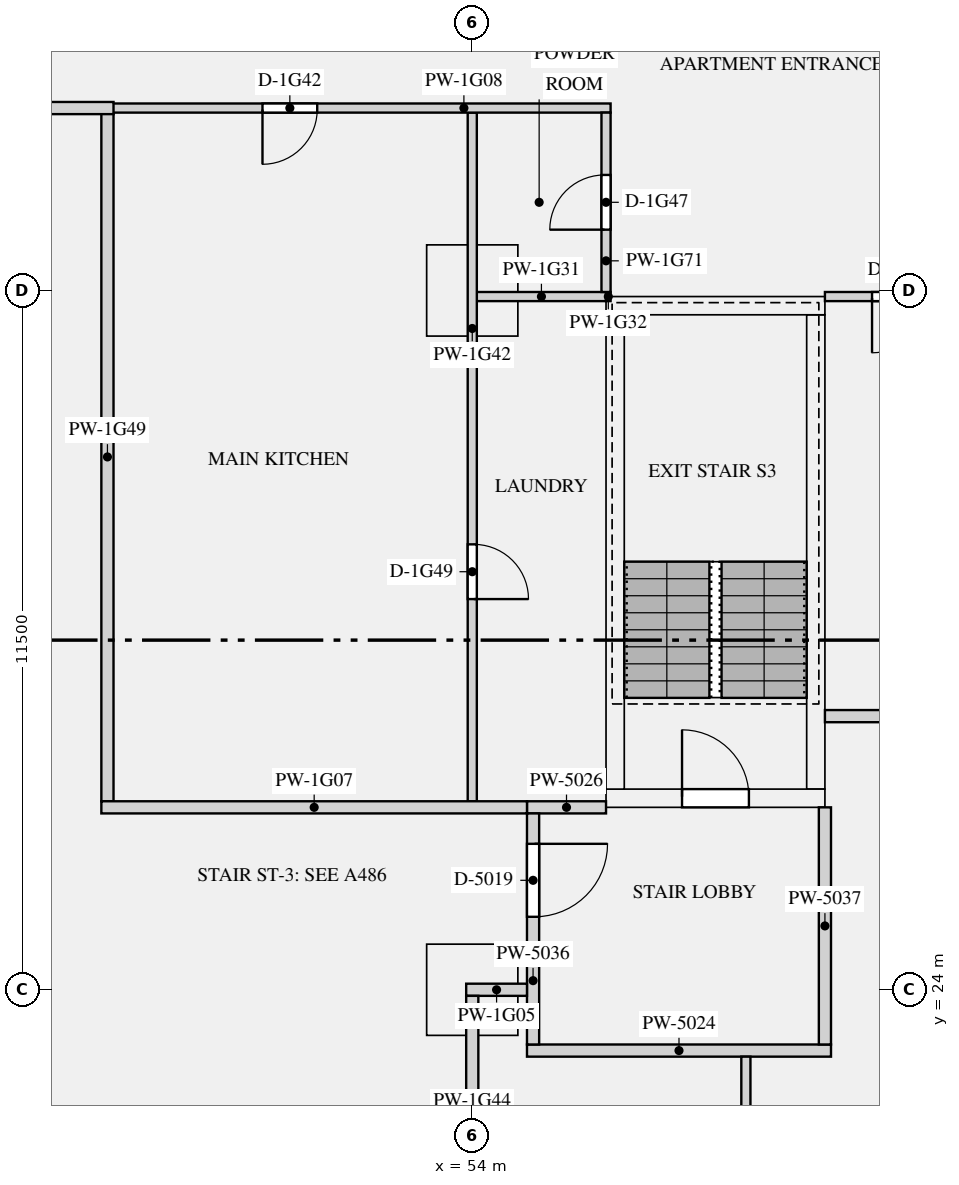
"""IFC4 building model, lengths in metres.
Left out: names, types, materials, properties, quantities, classifications, styles, units other than length and angle.
Written with IfcOpenShell. Run it as: python <this file> out.ifc"""

import sys

from ifc_helpers import new_model, si_unit, direction, frame, frame_2d, origin, origin_2d, place, context, subcontext, project, spatial, rectangle, extrude, element, fill, save


model = new_model("IFC4")
c1 = context("Model", 3, precision=1e-05, world=origin(), true_north=direction((0.0, 1.0)))
c2 = subcontext(c1, "Body", "Model", "MODEL_VIEW")
j1 = project(units=[si_unit("LENGTHUNIT", "METRE"), si_unit("PLANEANGLEUNIT", "RADIAN")], contexts=[c1])
p1 = place(None, origin())
s1 = spatial("IfcSite", under=j1, at=p1, CompositionType="ELEMENT")
p2 = place(p1, origin())
s2 = spatial("IfcBuilding", under=s1, at=p2, CompositionType="ELEMENT")
p3 = place(p2, frame((0.0, 0.0, 66.75)))
s3 = spatial("IfcBuildingStorey", under=s2, at=p3, CompositionType="ELEMENT", Elevation=66.75)
for number, where, z_axis, x_axis in (
    (1, (54.0, 24.0, 0.0), (0.0, 0.0, 1.0), (1.0, 0.0, 0.0)),
    (2, (54.0, 35.5, 0.0), (0.0, 0.0, 1.0), (1.0, 0.0, 0.0)),
):
    element("IfcColumn", number, at=place(p3, frame(where, z_axis=z_axis, x_axis=x_axis)), inside=s3, PredefinedType="COLUMN", context=c2, shape_type="SweptSolid", body=[
        extrude(rectangle(XDim=1.5, YDim=1.5, at=origin_2d()), origin(), (0.0, 0.0, 1.0), 3.15),
    ])
p4 = place(p3, frame((56.2, 27.15, 0.0), z_axis=(0.0, 0.0, 1.0), x_axis=(1.0, 0.0, 0.0)))
e3 = element("IfcWall", 3, at=p4, inside=s3, PredefinedType="SHEAR", context=c2, shape_type="SweptSolid", body=[
    extrude(rectangle(XDim=3.6, YDim=0.3, at=frame_2d((1.8, 0.0))), origin(), (0.0, 0.0, 1.0), 3.15),
])
p5 = place(p4, frame((1.25, 0.0, 0.0)))
e4 = element("IfcOpeningElement", 4, at=p5, cuts=e3, PredefinedType="OPENING", context=c2, shape_type="SweptSolid", body=[
    extrude(rectangle(XDim=1.1, YDim=2.1, at=frame_2d((0.55, 1.05))), frame((0.0, 0.16, 0.0), z_axis=(0.0, -1.0, 0.0), x_axis=(1.0, 0.0, 0.0)), (0.0, 0.0, 1.0), 0.32),
])
p6 = place(p3, frame((56.2, 35.25, 0.0), z_axis=(0.0, 0.0, 1.0), x_axis=(1.0, 0.0, 0.0)))
e5 = element("IfcWall", 5, at=p6, inside=s3, PredefinedType="SHEAR", context=c2, shape_type="SweptSolid", body=[
    extrude(rectangle(XDim=3.6, YDim=0.3, at=frame_2d((1.8, 0.0))), origin(), (0.0, 0.0, 1.0), 3.15),
])
for number, where, z_axis, x_axis in (
    (6, (56.35, 27.3, 0.0), (0.0, 0.0, 1.0), (0.0, 1.0, 0.0)),
    (7, (59.65, 27.3, 0.0), (0.0, 0.0, 1.0), (0.0, 1.0, 0.0)),
):
    element("IfcWall", number, at=place(p3, frame(where, z_axis=z_axis, x_axis=x_axis)), inside=s3, PredefinedType="SHEAR", context=c2, shape_type="SweptSolid", body=[
        extrude(rectangle(XDim=7.8, YDim=0.3, at=frame_2d((3.9, 0.0))), origin(), (0.0, 0.0, 1.0), 3.15),
    ])
p7 = place(p3, frame((54.9, 23.0, 0.0), z_axis=(0.0, 0.0, 1.0), x_axis=(1.0, 0.0, 0.0)))
e8 = element("IfcWall", 8, at=p7, inside=s3, PredefinedType="PARTITIONING", context=c2, shape_type="SweptSolid", body=[
    extrude(rectangle(XDim=5.0, YDim=0.2, at=frame_2d((2.5, 0.0))), origin(), (0.0, 0.0, 1.0), 2.83),
])
p8 = place(p3, frame((54.9, 27.0, 0.0), z_axis=(0.0, 0.0, 1.0), x_axis=(1.0, 0.0, 0.0)))
e9 = element("IfcWall", 9, at=p8, inside=s3, PredefinedType="PARTITIONING", context=c2, shape_type="SweptSolid", body=[
    extrude(rectangle(XDim=1.3, YDim=0.2, at=frame_2d((0.65, 0.0))), origin(), (0.0, 0.0, 1.0), 2.83),
])
p9 = place(p3, frame((55.0, 23.1, 0.0), z_axis=(0.0, 0.0, 1.0), x_axis=(0.0, 1.0, 0.0)))
e10 = element("IfcWall", 10, at=p9, inside=s3, PredefinedType="PARTITIONING", context=c2, shape_type="SweptSolid", body=[
    extrude(rectangle(XDim=3.8, YDim=0.2, at=frame_2d((1.9, 0.0))), origin(), (0.0, 0.0, 1.0), 2.83),
])
p10 = place(p9, frame((2.1, 0.0, 0.0)))
e11 = element("IfcOpeningElement", 11, at=p10, cuts=e10, PredefinedType="OPENING", context=c2, shape_type="SweptSolid", body=[
    extrude(rectangle(XDim=1.2, YDim=2.1, at=frame_2d((0.6, 1.05))), frame((0.0, 0.11, 0.0), z_axis=(0.0, -1.0, 0.0), x_axis=(1.0, 0.0, 0.0)), (0.0, 0.0, 1.0), 0.22),
])
p11 = place(p3, frame((59.8, 23.1, 0.0), z_axis=(0.0, 0.0, 1.0), x_axis=(0.0, 1.0, 0.0)))
e12 = element("IfcWall", 12, at=p11, inside=s3, PredefinedType="PARTITIONING", context=c2, shape_type="SweptSolid", body=[
    extrude(rectangle(XDim=3.9, YDim=0.2, at=frame_2d((1.95, 0.0))), origin(), (0.0, 0.0, 1.0), 2.83),
])
p12 = place(p3, frame((53.9, 24.0, 0.0), z_axis=(0.0, 0.0, 1.0), x_axis=(1.0, 0.0, 0.0)))
e13 = element("IfcWall", 13, at=p12, inside=s3, PredefinedType="PARTITIONING", context=c2, shape_type="SweptSolid", body=[
    extrude(rectangle(XDim=1.0, YDim=0.2, at=frame_2d((0.5, 0.0))), origin(), (0.0, 0.0, 1.0), 2.83),
])
p13 = place(p3, frame((47.9, 27.0, 0.0), z_axis=(0.0, 0.0, 1.0), x_axis=(1.0, 0.0, 0.0)))
e14 = element("IfcWall", 14, at=p13, inside=s3, PredefinedType="PARTITIONING", context=c2, shape_type="SweptSolid", body=[
    extrude(rectangle(XDim=7.0, YDim=0.2, at=frame_2d((3.5, 0.0))), origin(), (0.0, 0.0, 1.0), 2.83),
])
p14 = place(p3, frame((47.9, 38.5, 0.0), z_axis=(0.0, 0.0, 1.0), x_axis=(1.0, 0.0, 0.0)))
e15 = element("IfcWall", 15, at=p14, inside=s3, PredefinedType="PARTITIONING", context=c2, shape_type="SweptSolid", body=[
    extrude(rectangle(XDim=8.375, YDim=0.15, at=frame_2d((4.188, 0.0))), origin(), (0.0, 0.0, 1.0), 2.83),
])
p15 = place(p14, frame((2.65, 0.0, 0.0)))
e16 = element("IfcOpeningElement", 16, at=p15, cuts=e15, PredefinedType="OPENING", context=c2, shape_type="SweptSolid", body=[
    extrude(rectangle(XDim=0.9, YDim=2.1, at=frame_2d((0.45, 1.05))), frame((0.0, 0.085, 0.0), z_axis=(0.0, -1.0, 0.0), x_axis=(1.0, 0.0, 0.0)), (0.0, 0.0, 1.0), 0.17),
])
p16 = place(p3, frame((23.925, 38.5, 0.0), z_axis=(0.0, 0.0, 1.0), x_axis=(1.0, 0.0, 0.0)))
e17 = element("IfcWall", 17, at=p16, inside=s3, PredefinedType="PARTITIONING", context=c2, shape_type="SweptSolid", body=[
    extrude(rectangle(XDim=24.175, YDim=0.2, at=frame_2d((12.087, 0.0))), origin(), (0.0, 0.0, 1.0), 2.83),
])
p17 = place(p16, frame((21.375, 0.0, 0.0)))
e18 = element("IfcOpeningElement", 18, at=p17, cuts=e17, PredefinedType="OPENING", context=c2, shape_type="SweptSolid", body=[
    extrude(rectangle(XDim=1.1, YDim=2.1, at=frame_2d((0.55, 1.05))), frame((0.0, 0.11, 0.0), z_axis=(0.0, -1.0, 0.0), x_axis=(1.0, 0.0, 0.0)), (0.0, 0.0, 1.0), 0.22),
])
p18 = place(p3, frame((59.8, 28.5, 0.0), z_axis=(0.0, 0.0, 1.0), x_axis=(1.0, 0.0, 0.0)))
e19 = element("IfcWall", 19, at=p18, inside=s3, PredefinedType="PARTITIONING", context=c2, shape_type="SweptSolid", body=[
    extrude(rectangle(XDim=3.275, YDim=0.2, at=frame_2d((1.637, 0.0))), origin(), (0.0, 0.0, 1.0), 2.83),
])
p19 = place(p3, frame((54.075, 35.4, 0.0), z_axis=(0.0, 0.0, 1.0), x_axis=(1.0, 0.0, 0.0)))
e20 = element("IfcWall", 20, at=p19, inside=s3, PredefinedType="PARTITIONING", context=c2, shape_type="SweptSolid", body=[
    extrude(rectangle(XDim=2.125, YDim=0.15, at=frame_2d((1.062, 0.0))), origin(), (0.0, 0.0, 1.0), 2.83),
])
p20 = place(p3, frame((56.2, 35.4, 0.0), z_axis=(0.0, 0.0, 1.0), x_axis=(1.0, 0.0, 0.0)))
e21 = element("IfcWall", 21, at=p20, inside=s3, PredefinedType="PARTITIONING", context=c2, shape_type="SweptSolid", body=[
    extrude(rectangle(XDim=0.075, YDim=0.15, at=frame_2d((0.038, 0.0))), origin(), (0.0, 0.0, 1.0), 2.83),
])
p21 = place(p3, frame((59.8, 35.4, 0.0), z_axis=(0.0, 0.0, 1.0), x_axis=(1.0, 0.0, 0.0)))
e22 = element("IfcWall", 22, at=p21, inside=s3, PredefinedType="PARTITIONING", context=c2, shape_type="SweptSolid", body=[
    extrude(rectangle(XDim=3.125, YDim=0.15, at=frame_2d((1.562, 0.0))), origin(), (0.0, 0.0, 1.0), 2.83),
])
p22 = place(p21, frame((0.775, 0.0, 0.0)))
e23 = element("IfcOpeningElement", 23, at=p22, cuts=e22, PredefinedType="OPENING", context=c2, shape_type="SweptSolid", body=[
    extrude(rectangle(XDim=0.9, YDim=2.1, at=frame_2d((0.45, 1.05))), frame((0.0, 0.085, 0.0), z_axis=(0.0, -1.0, 0.0), x_axis=(1.0, 0.0, 0.0)), (0.0, 0.0, 1.0), 0.17),
])
p23 = place(p3, frame((54.0, 27.1, 0.0), z_axis=(0.0, 0.0, 1.0), x_axis=(0.0, 1.0, 0.0)))
e24 = element("IfcWall", 24, at=p23, inside=s3, PredefinedType="PARTITIONING", context=c2, shape_type="SweptSolid", body=[
    extrude(rectangle(XDim=11.325, YDim=0.15, at=frame_2d((5.663, 0.0))), origin(), (0.0, 0.0, 1.0), 2.83),
])
p24 = place(p23, frame((3.325, 0.0, 0.0)))
e25 = element("IfcOpeningElement", 25, at=p24, cuts=e24, PredefinedType="OPENING", context=c2, shape_type="SweptSolid", body=[
    extrude(rectangle(XDim=0.9, YDim=2.1, at=frame_2d((0.45, 1.05))), frame((0.0, 0.085, 0.0), z_axis=(0.0, -1.0, 0.0), x_axis=(1.0, 0.0, 0.0)), (0.0, 0.0, 1.0), 0.17),
])
p25 = place(p3, frame((54.0, 16.1, 0.0), z_axis=(0.0, 0.0, 1.0), x_axis=(0.0, 1.0, 0.0)))
e26 = element("IfcWall", 26, at=p25, inside=s3, PredefinedType="PARTITIONING", context=c2, shape_type="SweptSolid", body=[
    extrude(rectangle(XDim=7.8, YDim=0.2, at=frame_2d((3.9, 0.0))), origin(), (0.0, 0.0, 1.0), 2.83),
])
p26 = place(p25, frame((2.35, 0.0, 0.0)))
e27 = element("IfcOpeningElement", 27, at=p26, cuts=e26, PredefinedType="OPENING", context=c2, shape_type="SweptSolid", body=[
    extrude(rectangle(XDim=1.1, YDim=2.1, at=frame_2d((0.55, 1.05))), frame((0.0, 0.11, 0.0), z_axis=(0.0, -1.0, 0.0), x_axis=(1.0, 0.0, 0.0)), (0.0, 0.0, 1.0), 0.22),
])
p27 = place(p3, frame((48.0, 27.1, 0.0), z_axis=(0.0, 0.0, 1.0), x_axis=(0.0, 1.0, 0.0)))
e28 = element("IfcWall", 28, at=p27, inside=s3, PredefinedType="PARTITIONING", context=c2, shape_type="SweptSolid", body=[
    extrude(rectangle(XDim=11.325, YDim=0.2, at=frame_2d((5.663, 0.0))), origin(), (0.0, 0.0, 1.0), 2.83),
])
p28 = place(p3, frame((56.2, 35.475, 0.0), z_axis=(0.0, 0.0, 1.0), x_axis=(0.0, 1.0, 0.0)))
e29 = element("IfcWall", 29, at=p28, inside=s3, PredefinedType="PARTITIONING", context=c2, shape_type="SweptSolid", body=[
    extrude(rectangle(XDim=2.95, YDim=0.15, at=frame_2d((1.475, 0.0))), origin(), (0.0, 0.0, 1.0), 2.83),
])
p29 = place(p28, frame((1.025, 0.0, 0.0)))
e30 = element("IfcOpeningElement", 30, at=p29, cuts=e29, PredefinedType="OPENING", context=c2, shape_type="SweptSolid", body=[
    extrude(rectangle(XDim=0.9, YDim=2.1, at=frame_2d((0.45, 1.05))), frame((0.0, 0.085, 0.0), z_axis=(0.0, -1.0, 0.0), x_axis=(1.0, 0.0, 0.0)), (0.0, 0.0, 1.0), 0.17),
])
p30 = place(p3, frame((58.5, 12.575, 0.0), z_axis=(0.0, 0.0, 1.0), x_axis=(0.0, 1.0, 0.0)))
e31 = element("IfcWall", 31, at=p30, inside=s3, PredefinedType="PARTITIONING", context=c2, shape_type="SweptSolid", body=[
    extrude(rectangle(XDim=10.325, YDim=0.15, at=frame_2d((5.163, 0.0))), origin(), (0.0, 0.0, 1.0), 2.83),
])
p31 = place(p30, frame((1.475, 0.0, 0.0)))
e32 = element("IfcOpeningElement", 32, at=p31, cuts=e31, PredefinedType="OPENING", context=c2, shape_type="SweptSolid", body=[
    extrude(rectangle(XDim=0.9, YDim=2.1, at=frame_2d((0.45, 1.05))), frame((0.0, 0.085, 0.0), z_axis=(0.0, -1.0, 0.0), x_axis=(1.0, 0.0, 0.0)), (0.0, 0.0, 1.0), 0.17),
])
p32 = place(p5, origin())
e33 = element("IfcDoor", 33, at=p32, inside=s3, OperationType="SINGLE_SWING_LEFT", PredefinedType="DOOR", context=c2, shape_type="SweptSolid", body=[
    extrude(rectangle(XDim=1.1, YDim=2.1, at=frame_2d((0.55, 1.05))), frame((0.0, 0.025, 0.0), z_axis=(0.0, -1.0, 0.0), x_axis=(1.0, 0.0, 0.0)), (0.0, 0.0, 1.0), 0.05),
])
fill(e4, e33)
p33 = place(p10, frame((1.2, 0.0, 0.0), z_axis=(0.0, 0.0, 1.0), x_axis=(-1.0, 0.0, 0.0)))
e34 = element("IfcDoor", 34, at=p33, inside=s3, OperationType="SINGLE_SWING_LEFT", PredefinedType="DOOR", context=c2, shape_type="SweptSolid", body=[
    extrude(rectangle(XDim=1.2, YDim=2.1, at=frame_2d((0.6, 1.05))), frame((0.0, 0.025, 0.0), z_axis=(0.0, -1.0, 0.0), x_axis=(1.0, 0.0, 0.0)), (0.0, 0.0, 1.0), 0.05),
])
fill(e11, e34)
p34 = place(p15, frame((0.9, 0.0, 0.0), z_axis=(0.0, 0.0, 1.0), x_axis=(-1.0, 0.0, 0.0)))
e35 = element("IfcDoor", 35, at=p34, inside=s3, OperationType="SINGLE_SWING_RIGHT", PredefinedType="DOOR", context=c2, shape_type="SweptSolid", body=[
    extrude(rectangle(XDim=0.9, YDim=2.1, at=frame_2d((0.45, 1.05))), frame((0.0, 0.025, 0.0), z_axis=(0.0, -1.0, 0.0), x_axis=(1.0, 0.0, 0.0)), (0.0, 0.0, 1.0), 0.05),
])
fill(e16, e35)
p35 = place(p29, origin())
e36 = element("IfcDoor", 36, at=p35, inside=s3, OperationType="SINGLE_SWING_LEFT", PredefinedType="DOOR", context=c2, shape_type="SweptSolid", body=[
    extrude(rectangle(XDim=0.9, YDim=2.1, at=frame_2d((0.45, 1.05))), frame((0.0, 0.025, 0.0), z_axis=(0.0, -1.0, 0.0), x_axis=(1.0, 0.0, 0.0)), (0.0, 0.0, 1.0), 0.05),
])
fill(e30, e36)
p36 = place(p22, frame((0.9, 0.0, 0.0), z_axis=(0.0, 0.0, 1.0), x_axis=(-1.0, 0.0, 0.0)))
e37 = element("IfcDoor", 37, at=p36, inside=s3, OperationType="SINGLE_SWING_RIGHT", PredefinedType="DOOR", context=c2, shape_type="SweptSolid", body=[
    extrude(rectangle(XDim=0.9, YDim=2.1, at=frame_2d((0.45, 1.05))), frame((0.0, 0.025, 0.0), z_axis=(0.0, -1.0, 0.0), x_axis=(1.0, 0.0, 0.0)), (0.0, 0.0, 1.0), 0.05),
])
fill(e23, e37)
p37 = place(p24, frame((0.9, 0.0, 0.0), z_axis=(0.0, 0.0, 1.0), x_axis=(-1.0, 0.0, 0.0)))
e38 = element("IfcDoor", 38, at=p37, inside=s3, OperationType="SINGLE_SWING_RIGHT", PredefinedType="DOOR", context=c2, shape_type="SweptSolid", body=[
    extrude(rectangle(XDim=0.9, YDim=2.1, at=frame_2d((0.45, 1.05))), frame((0.0, 0.025, 0.0), z_axis=(0.0, -1.0, 0.0), x_axis=(1.0, 0.0, 0.0)), (0.0, 0.0, 1.0), 0.05),
])
fill(e25, e38)
save(model, sys.argv[1])
